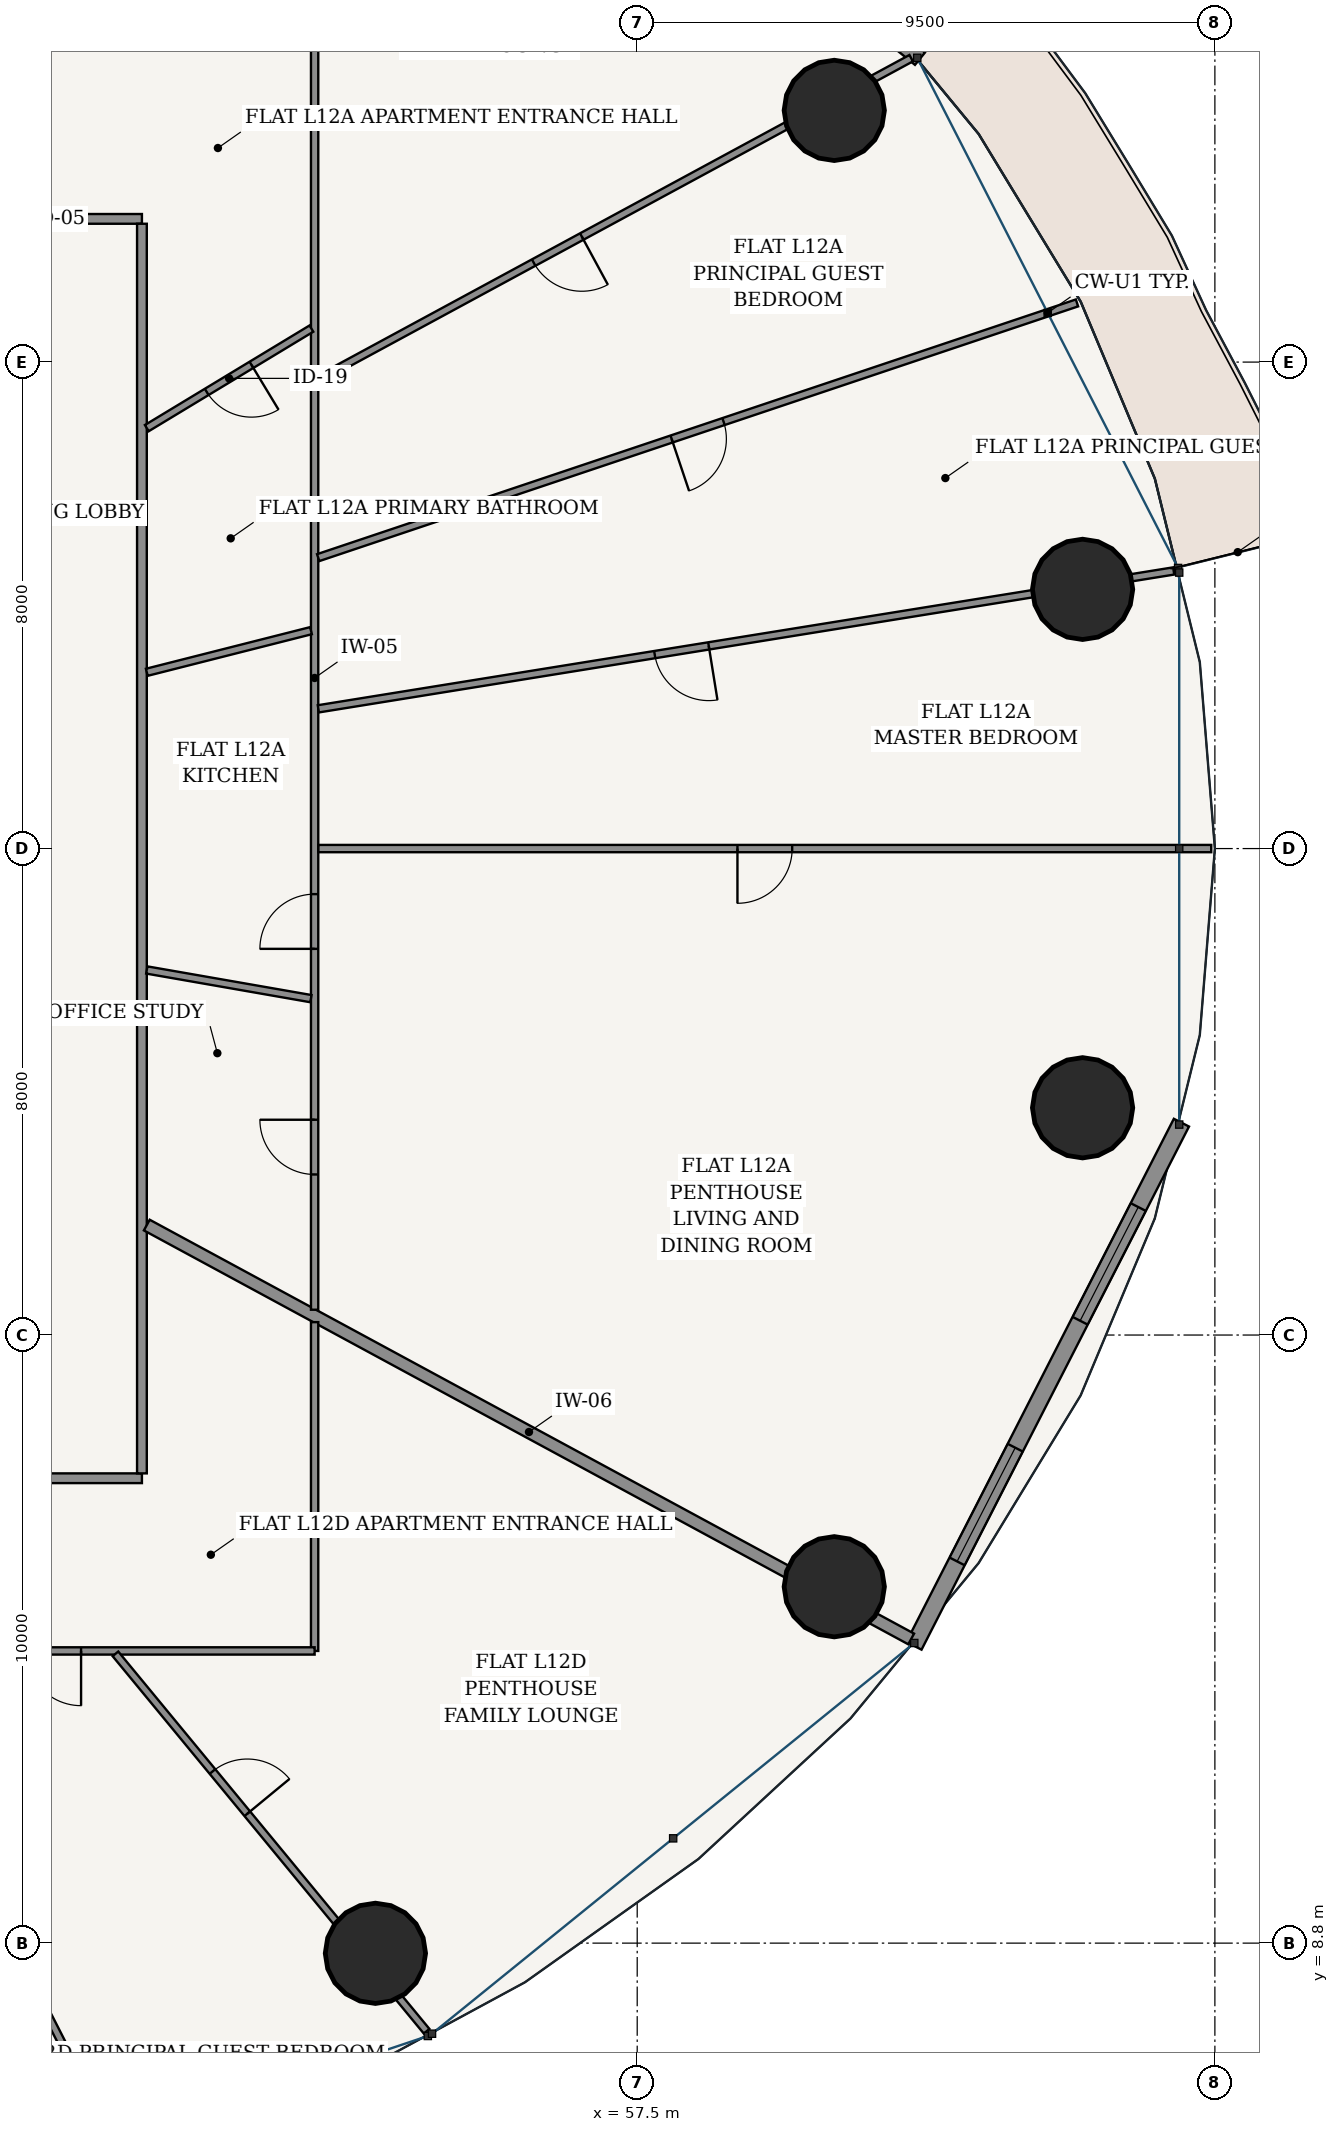
"""IFC4 building model, lengths in metres.
Left out: names, types, materials, properties, quantities, classifications, styles, units other than length and angle.
Written with IfcOpenShell. Run it as: python <this file> out.ifc"""

import sys

from ifc_helpers import new_model, si_unit, direction, frame, frame_2d, origin, origin_2d, place, context, subcontext, project, spatial, rectangle, hollow_circle, extrude, source, transform, mapped, element, fill, save


model = new_model("IFC4")
c1 = context("Model", 3, precision=1e-05, world=origin(), true_north=direction((-0.2419218956, 0.970295726276)))
c2 = subcontext(c1, "Body", "Model", "MODEL_VIEW")
j1 = project(units=[si_unit("LENGTHUNIT", "METRE"), si_unit("PLANEANGLEUNIT", "RADIAN")], contexts=[c1])
p1 = place(None, origin())
s1 = spatial("IfcSite", under=j1, at=p1, CompositionType="ELEMENT")
p2 = place(p1, origin())
s2 = spatial("IfcBuilding", under=s1, at=p2, CompositionType="ELEMENT")
p3 = place(p2, frame((0.0, 0.0, 49.2)))
s3 = spatial("IfcBuildingStorey", under=s2, at=p3, CompositionType="ELEMENT", Elevation=49.2)
for number, where, z_axis, x_axis in (
    (1, (64.824, 31.063, 0.0), (0.0, 0.0, 1.0), (1.0, 0.0, 0.0)),
    (2, (60.741, 38.939, 0.0), (0.0, 0.0, 1.0), (1.0, 0.0, 0.0)),
    (3, (53.195, 8.632, 0.0), (0.0, 0.0, 1.0), (1.0, 0.0, 0.0)),
    (4, (60.741, 14.661, 0.0), (0.0, 0.0, 1.0), (1.0, 0.0, 0.0)),
    (5, (64.824, 22.537, 0.0), (0.0, 0.0, 1.0), (1.0, 0.0, 0.0)),
):
    element("IfcColumn", number, at=place(p3, frame(where, z_axis=z_axis, x_axis=x_axis)), inside=s3, PredefinedType="COLUMN", context=c2, shape_type="SweptSolid", body=[
        extrude(hollow_circle(Radius=0.825, WallThickness=0.05, at=origin_2d()), origin(), (0.0, 0.0, 1.0), 3.6),
    ])
p4 = place(p3, frame((62.15, 39.789, 0.0), z_axis=(0.0, 0.0, 1.0), x_axis=(-0.777005352078, 0.62949398952, 0.0)))
e6 = element("IfcWall", 6, at=p4, inside=s3, PredefinedType="SOLIDWALL", context=c2, shape_type="SweptSolid", body=[
    extrude(rectangle(XDim=10.447, YDim=0.26, at=frame_2d((5.223, 0.0))), origin(), (0.0, 0.0, 1.0), 3.32),
])
p5 = place(p4, frame((4.548, 0.0, 0.0)))
e7 = element("IfcOpeningElement", 7, at=p5, cuts=e6, PredefinedType="OPENING", context=c2, shape_type="SweptSolid", body=[
    extrude(rectangle(XDim=1.35, YDim=2.2, at=frame_2d((0.675, 1.1))), frame((0.0, 0.14, 0.0), z_axis=(0.0, -1.0, 0.0), x_axis=(1.0, 0.0, 0.0)), (0.0, 0.0, 1.0), 0.28),
])
p6 = place(p3, frame((62.051, 13.689, 0.0), z_axis=(0.0, 0.0, 1.0), x_axis=(0.455220575541, 0.890378698984, 0.0)))
e8 = element("IfcWall", 8, at=p6, inside=s3, PredefinedType="SOLIDWALL", context=c2, shape_type="SweptSolid", body=[
    extrude(rectangle(XDim=9.662, YDim=0.28, at=frame_2d((4.831, 0.0))), origin(), (0.0, 0.0, 1.0), 3.32),
])
p7 = place(p6, frame((1.559, 0.0, 0.85)))
e9 = element("IfcOpeningElement", 9, at=p7, cuts=e8, PredefinedType="OPENING", context=c2, shape_type="SweptSolid", body=[
    extrude(rectangle(XDim=2.1, YDim=1.95, at=frame_2d((1.05, 0.975))), frame((0.0, 0.15, 0.0), z_axis=(0.0, -1.0, 0.0), x_axis=(1.0, 0.0, 0.0)), (0.0, 0.0, 1.0), 0.3),
])
p8 = place(p6, frame((6.003, 0.0, 0.85)))
e10 = element("IfcOpeningElement", 10, at=p8, cuts=e8, PredefinedType="OPENING", context=c2, shape_type="SweptSolid", body=[
    extrude(rectangle(XDim=2.1, YDim=1.95, at=frame_2d((1.05, 0.975))), frame((0.0, 0.15, 0.0), z_axis=(0.0, -1.0, 0.0), x_axis=(1.0, 0.0, 0.0)), (0.0, 0.0, 1.0), 0.3),
])
p9 = place(p3, frame((26.645, 16.445, 0.0), z_axis=(0.0, 0.0, 1.0), x_axis=(1.0, 0.0, 0.0)))
e11 = element("IfcWall", 11, at=p9, inside=s3, PredefinedType="PARTITIONING", context=c2, shape_type="SweptSolid", body=[
    extrude(rectangle(XDim=22.71, YDim=0.16, at=frame_2d((11.355, 0.0))), origin(), (0.0, 0.0, 1.0), 2.688),
])
p10 = place(p9, frame((19.962, 0.0, 0.0)))
e12 = element("IfcOpeningElement", 12, at=p10, cuts=e11, PredefinedType="OPENING", context=c2, shape_type="SweptSolid", body=[
    extrude(rectangle(XDim=0.98, YDim=2.2, at=frame_2d((0.49, 1.1))), frame((0.0, 0.09, 0.0), z_axis=(0.0, -1.0, 0.0), x_axis=(1.0, 0.0, 0.0)), (0.0, 0.0, 1.0), 0.18),
])
p11 = place(p3, frame((26.645, 37.155, 0.0), z_axis=(0.0, 0.0, 1.0), x_axis=(1.0, 0.0, 0.0)))
e13 = element("IfcWall", 13, at=p11, inside=s3, PredefinedType="PARTITIONING", context=c2, shape_type="SweptSolid", body=[
    extrude(rectangle(XDim=22.71, YDim=0.16, at=frame_2d((11.355, 0.0))), origin(), (0.0, 0.0, 1.0), 2.688),
])
p12 = place(p11, frame((19.075, 0.0, 0.0)))
e14 = element("IfcOpeningElement", 14, at=p12, cuts=e13, PredefinedType="OPENING", context=c2, shape_type="SweptSolid", body=[
    extrude(rectangle(XDim=0.98, YDim=2.2, at=frame_2d((0.49, 1.1))), frame((0.0, 0.09, 0.0), z_axis=(0.0, -1.0, 0.0), x_axis=(1.0, 0.0, 0.0)), (0.0, 0.0, 1.0), 0.18),
])
p13 = place(p11, frame((6.221, 0.0, 0.0)))
e15 = element("IfcOpeningElement", 15, at=p13, cuts=e13, PredefinedType="OPENING", context=c2, shape_type="SweptSolid", body=[
    extrude(rectangle(XDim=0.98, YDim=2.2, at=frame_2d((0.49, 1.1))), frame((0.0, 0.09, 0.0), z_axis=(0.0, -1.0, 0.0), x_axis=(1.0, 0.0, 0.0)), (0.0, 0.0, 1.0), 0.18),
])
p14 = place(p3, frame((49.355, 16.525, 0.0), z_axis=(0.0, 0.0, 1.0), x_axis=(0.0, 1.0, 0.0)))
e16 = element("IfcWall", 16, at=p14, inside=s3, PredefinedType="PARTITIONING", context=c2, shape_type="SweptSolid", body=[
    extrude(rectangle(XDim=20.55, YDim=0.16, at=frame_2d((10.275, 0.0))), origin(), (0.0, 0.0, 1.0), 2.688),
])
p15 = place(p3, frame((49.435, 20.608, 0.0), z_axis=(0.0, 0.0, 1.0), x_axis=(0.879369737803, -0.476139542819, 0.0)))
e17 = element("IfcWall", 17, at=p15, inside=s3, PredefinedType="PARTITIONING", context=c2, shape_type="SweptSolid", body=[
    extrude(rectangle(XDim=14.295, YDim=0.2, at=frame_2d((7.147, 0.0))), origin(), (0.0, 0.0, 1.0), 2.688),
])
p16 = place(p3, frame((52.195, 39.995, 0.0), z_axis=(0.0, 0.0, 1.0), x_axis=(0.0, -1.0, 0.0)))
e18 = element("IfcWall", 18, at=p16, inside=s3, PredefinedType="PARTITIONING", context=c2, shape_type="SweptSolid", body=[
    extrude(rectangle(XDim=20.779, YDim=0.12, at=frame_2d((10.39, 0.0))), origin(), (0.0, 0.0, 1.0), 2.688),
])
p17 = place(p16, frame((13.944, 0.0, 0.0)))
e19 = element("IfcOpeningElement", 19, at=p17, cuts=e18, PredefinedType="OPENING", context=c2, shape_type="SweptSolid", body=[
    extrude(rectangle(XDim=0.9, YDim=2.15, at=frame_2d((0.45, 1.075))), frame((0.0, 0.07, 0.0), z_axis=(0.0, -1.0, 0.0), x_axis=(1.0, 0.0, 0.0)), (0.0, 0.0, 1.0), 0.14),
])
p18 = place(p16, frame((17.655, 0.0, 0.0)))
e20 = element("IfcOpeningElement", 20, at=p18, cuts=e18, PredefinedType="OPENING", context=c2, shape_type="SweptSolid", body=[
    extrude(rectangle(XDim=0.9, YDim=2.15, at=frame_2d((0.45, 1.075))), frame((0.0, 0.07, 0.0), z_axis=(0.0, -1.0, 0.0), x_axis=(1.0, 0.0, 0.0)), (0.0, 0.0, 1.0), 0.14),
])
p19 = place(p3, frame((52.257, 26.8, 0.0), z_axis=(0.0, 0.0, 1.0), x_axis=(1.0, 0.0, 0.0)))
e21 = element("IfcWall", 21, at=p19, inside=s3, PredefinedType="PARTITIONING", context=c2, shape_type="SweptSolid", body=[
    extrude(rectangle(XDim=14.683, YDim=0.12, at=frame_2d((7.341, 0.0))), origin(), (0.0, 0.0, 1.0), 2.762),
])
p20 = place(p19, frame((6.892, 0.0, 0.0)))
e22 = element("IfcOpeningElement", 22, at=p20, cuts=e21, PredefinedType="OPENING", context=c2, shape_type="SweptSolid", body=[
    extrude(rectangle(XDim=0.9, YDim=2.15, at=frame_2d((0.45, 1.075))), frame((0.0, 0.07, 0.0), z_axis=(0.0, -1.0, 0.0), x_axis=(1.0, 0.0, 0.0)), (0.0, 0.0, 1.0), 0.14),
])
p21 = place(p3, frame((52.256, 29.098, 0.0), z_axis=(0.0, 0.0, 1.0), x_axis=(0.987257017041, 0.159133850272, 0.0)))
e23 = element("IfcWall", 23, at=p21, inside=s3, PredefinedType="PARTITIONING", context=c2, shape_type="SweptSolid", body=[
    extrude(rectangle(XDim=14.248, YDim=0.12, at=frame_2d((7.124, 0.0))), origin(), (0.0, 0.0, 1.0), 2.688),
])
p22 = place(p21, frame((5.603, 0.0, 0.0)))
e24 = element("IfcOpeningElement", 24, at=p22, cuts=e23, PredefinedType="OPENING", context=c2, shape_type="SweptSolid", body=[
    extrude(rectangle(XDim=0.9, YDim=2.15, at=frame_2d((0.45, 1.075))), frame((0.0, 0.07, 0.0), z_axis=(0.0, -1.0, 0.0), x_axis=(1.0, 0.0, 0.0)), (0.0, 0.0, 1.0), 0.14),
])
p23 = place(p3, frame((52.254, 31.584, 0.0), z_axis=(0.0, 0.0, 1.0), x_axis=(0.948022802246, 0.318202398516, 0.0)))
e25 = element("IfcWall", 25, at=p23, inside=s3, PredefinedType="PARTITIONING", context=c2, shape_type="SweptSolid", body=[
    extrude(rectangle(XDim=13.163, YDim=0.12, at=frame_2d((6.582, 0.0))), origin(), (0.0, 0.0, 1.0), 2.762),
])
p24 = place(p23, frame((6.131, 0.0, 0.0)))
e26 = element("IfcOpeningElement", 26, at=p24, cuts=e25, PredefinedType="OPENING", context=c2, shape_type="SweptSolid", body=[
    extrude(rectangle(XDim=0.9, YDim=2.15, at=frame_2d((0.45, 1.075))), frame((0.0, 0.07, 0.0), z_axis=(0.0, -1.0, 0.0), x_axis=(1.0, 0.0, 0.0)), (0.0, 0.0, 1.0), 0.14),
])
p25 = place(p3, frame((52.25, 34.515, 0.0), z_axis=(0.0, 0.0, 1.0), x_axis=(0.879370672984, 0.476137815654, 0.0)))
e27 = element("IfcWall", 27, at=p25, inside=s3, PredefinedType="PARTITIONING", context=c2, shape_type="SweptSolid", body=[
    extrude(rectangle(XDim=11.094, YDim=0.12, at=frame_2d((5.547, 0.0))), origin(), (0.0, 0.0, 1.0), 2.688),
])
p26 = place(p25, frame((4.034, 0.0, 0.0)))
e28 = element("IfcOpeningElement", 28, at=p26, cuts=e27, PredefinedType="OPENING", context=c2, shape_type="SweptSolid", body=[
    extrude(rectangle(XDim=0.9, YDim=2.15, at=frame_2d((0.45, 1.075))), frame((0.0, 0.07, 0.0), z_axis=(0.0, -1.0, 0.0), x_axis=(1.0, 0.0, 0.0)), (0.0, 0.0, 1.0), 0.14),
])
p27 = place(p3, frame((49.435, 24.803, 0.0), z_axis=(0.0, 0.0, 1.0), x_axis=(0.985100365489, -0.171980434681, 0.0)))
e29 = element("IfcWall", 29, at=p27, inside=s3, PredefinedType="PARTITIONING", context=c2, shape_type="SweptSolid", body=[
    extrude(rectangle(XDim=2.74, YDim=0.12, at=frame_2d((1.37, 0.0))), origin(), (0.0, 0.0, 1.0), 3.32),
])
p28 = place(p3, frame((49.435, 29.699, 0.0), z_axis=(0.0, 0.0, 1.0), x_axis=(0.969327617988, 0.245772189243, 0.0)))
e30 = element("IfcWall", 30, at=p28, inside=s3, PredefinedType="PARTITIONING", context=c2, shape_type="SweptSolid", body=[
    extrude(rectangle(XDim=2.785, YDim=0.12, at=frame_2d((1.393, 0.0))), origin(), (0.0, 0.0, 1.0), 3.32),
])
p29 = place(p3, frame((49.435, 33.714, 0.0), z_axis=(0.0, 0.0, 1.0), x_axis=(0.855724035959, 0.517432482824, 0.0)))
e31 = element("IfcWall", 31, at=p29, inside=s3, PredefinedType="PARTITIONING", context=c2, shape_type="SweptSolid", body=[
    extrude(rectangle(XDim=3.163, YDim=0.12, at=frame_2d((1.582, 0.0))), origin(), (0.0, 0.0, 1.0), 3.32),
])
p30 = place(p29, frame((1.152, 0.0, 0.0)))
e32 = element("IfcOpeningElement", 32, at=p30, cuts=e31, PredefinedType="OPENING", context=c2, shape_type="SweptSolid", body=[
    extrude(rectangle(XDim=0.86, YDim=2.15, at=frame_2d((0.43, 1.075))), frame((0.0, 0.07, 0.0), z_axis=(0.0, -1.0, 0.0), x_axis=(1.0, 0.0, 0.0)), (0.0, 0.0, 1.0), 0.14),
])
p31 = place(p3, frame((43.335, 37.237, 0.0), z_axis=(0.0, 0.0, 1.0), x_axis=(0.455148959499, 0.890415310216, 0.0)))
e33 = element("IfcWall", 33, at=p31, inside=s3, PredefinedType="PARTITIONING", context=c2, shape_type="SweptSolid", body=[
    extrude(rectangle(XDim=12.598, YDim=0.2, at=frame_2d((6.299, 0.0))), origin(), (0.0, 0.0, 1.0), 2.762),
])
p32 = place(p3, frame((52.195, 19.012, 0.0), z_axis=(0.0, 0.0, 1.0), x_axis=(0.0, -1.0, 0.0)))
e34 = element("IfcWall", 34, at=p32, inside=s3, PredefinedType="PARTITIONING", context=c2, shape_type="SweptSolid", body=[
    extrude(rectangle(XDim=5.407, YDim=0.12, at=frame_2d((2.704, 0.0))), origin(), (0.0, 0.0, 1.0), 2.999),
])
p33 = place(p3, frame((52.195, 13.605, 0.0), z_axis=(0.0, 0.0, 1.0), x_axis=(-1.0, 0.0, 0.0)))
e35 = element("IfcWall", 35, at=p33, inside=s3, PredefinedType="PARTITIONING", context=c2, shape_type="SweptSolid", body=[
    extrude(rectangle(XDim=24.973, YDim=0.12, at=frame_2d((12.487, 0.0))), origin(), (0.0, 0.0, 1.0), 2.688),
])
p34 = place(p33, frame((3.841, 0.0, 0.0)))
e36 = element("IfcOpeningElement", 36, at=p34, cuts=e35, PredefinedType="OPENING", context=c2, shape_type="SweptSolid", body=[
    extrude(rectangle(XDim=0.9, YDim=2.15, at=frame_2d((0.45, 1.075))), frame((0.0, 0.07, 0.0), z_axis=(0.0, -1.0, 0.0), x_axis=(1.0, 0.0, 0.0)), (0.0, 0.0, 1.0), 0.14),
])
p35 = place(p33, frame((15.819, 0.0, 0.0)))
e37 = element("IfcOpeningElement", 37, at=p35, cuts=e35, PredefinedType="OPENING", context=c2, shape_type="SweptSolid", body=[
    extrude(rectangle(XDim=0.9, YDim=2.15, at=frame_2d((0.45, 1.075))), frame((0.0, 0.07, 0.0), z_axis=(0.0, -1.0, 0.0), x_axis=(1.0, 0.0, 0.0)), (0.0, 0.0, 1.0), 0.14),
])
p36 = place(p33, frame((21.123, 0.0, 0.0)))
e38 = element("IfcOpeningElement", 38, at=p36, cuts=e35, PredefinedType="OPENING", context=c2, shape_type="SweptSolid", body=[
    extrude(rectangle(XDim=0.9, YDim=2.15, at=frame_2d((0.45, 1.075))), frame((0.0, 0.07, 0.0), z_axis=(0.0, -1.0, 0.0), x_axis=(1.0, 0.0, 0.0)), (0.0, 0.0, 1.0), 0.14),
])
p37 = place(p3, frame((44.773, 13.55, 0.0), z_axis=(0.0, 0.0, 1.0), x_axis=(0.455131567849, -0.890424200001, 0.0)))
e39 = element("IfcWall", 39, at=p37, inside=s3, PredefinedType="PARTITIONING", context=c2, shape_type="SweptSolid", body=[
    extrude(rectangle(XDim=9.439, YDim=0.12, at=frame_2d((4.719, 0.0))), origin(), (0.0, 0.0, 1.0), 2.762),
])
p38 = place(p37, frame((4.269, 0.0, 0.0)))
e40 = element("IfcOpeningElement", 40, at=p38, cuts=e39, PredefinedType="OPENING", context=c2, shape_type="SweptSolid", body=[
    extrude(rectangle(XDim=0.9, YDim=2.15, at=frame_2d((0.45, 1.075))), frame((0.0, 0.07, 0.0), z_axis=(0.0, -1.0, 0.0), x_axis=(1.0, 0.0, 0.0)), (0.0, 0.0, 1.0), 0.14),
])
p39 = place(p3, frame((48.919, 13.557, 0.0), z_axis=(0.0, 0.0, 1.0), x_axis=(0.636193310573, -0.771529695852, 0.0)))
e41 = element("IfcWall", 41, at=p39, inside=s3, PredefinedType="PARTITIONING", context=c2, shape_type="SweptSolid", body=[
    extrude(rectangle(XDim=8.044, YDim=0.12, at=frame_2d((4.022, 0.0))), origin(), (0.0, 0.0, 1.0), 2.688),
])
p40 = place(p39, frame((2.508, 0.0, 0.0)))
e42 = element("IfcOpeningElement", 42, at=p40, cuts=e41, PredefinedType="OPENING", context=c2, shape_type="SweptSolid", body=[
    extrude(rectangle(XDim=0.9, YDim=2.15, at=frame_2d((0.45, 1.075))), frame((0.0, 0.07, 0.0), z_axis=(0.0, -1.0, 0.0), x_axis=(1.0, 0.0, 0.0)), (0.0, 0.0, 1.0), 0.14),
])
m1 = source(origin(), c2, "Body", "SweptSolid", [
    extrude(rectangle(XDim=2.1, YDim=1.95, at=frame_2d((1.05, 0.975))), frame((0.0, 0.03, 0.0), z_axis=(0.0, -1.0, 0.0), x_axis=(1.0, 0.0, 0.0)), (0.0, 0.0, 1.0), 0.06),
])
p41 = place(p7, origin())
e43 = element("IfcWindow", 43, at=p41, inside=s3, PartitioningType="SINGLE_PANEL", PredefinedType="WINDOW", context=c2, shape_type="MappedRepresentation", body=[
    mapped(m1, transform((0.0, 0.0, 0.0), scale=1.0)),
])
fill(e9, e43)
p42 = place(p8, origin())
e44 = element("IfcWindow", 44, at=p42, inside=s3, PartitioningType="SINGLE_PANEL", PredefinedType="WINDOW", context=c2, shape_type="MappedRepresentation", body=[
    mapped(m1, transform((0.0, 0.0, 0.0), scale=1.0)),
])
fill(e10, e44)
m2 = source(origin(), c2, "Body", "SweptSolid", [
    extrude(rectangle(XDim=0.86, YDim=2.15, at=frame_2d((0.43, 1.075))), frame((0.0, 0.025, 0.0), z_axis=(0.0, -1.0, 0.0), x_axis=(1.0, 0.0, 0.0)), (0.0, 0.0, 1.0), 0.05),
])
p43 = place(p30, frame((0.86, 0.0, 0.0), z_axis=(0.0, 0.0, 1.0), x_axis=(-1.0, 0.0, 0.0)))
e45 = element("IfcDoor", 45, at=p43, inside=s3, OperationType="SINGLE_SWING_LEFT", PredefinedType="DOOR", context=c2, shape_type="MappedRepresentation", body=[
    mapped(m2, transform((0.0, 0.0, 0.0), scale=1.0)),
])
fill(e32, e45)
m3 = source(origin(), c2, "Body", "SweptSolid", [
    extrude(rectangle(XDim=0.9, YDim=2.15, at=frame_2d((0.45, 1.075))), frame((0.0, 0.025, 0.0), z_axis=(0.0, -1.0, 0.0), x_axis=(1.0, 0.0, 0.0)), (0.0, 0.0, 1.0), 0.05),
])
p44 = place(p26, frame((0.9, 0.0, 0.0), z_axis=(0.0, 0.0, 1.0), x_axis=(-1.0, 0.0, 0.0)))
e46 = element("IfcDoor", 46, at=p44, inside=s3, OperationType="SINGLE_SWING_LEFT", PredefinedType="DOOR", context=c2, shape_type="MappedRepresentation", body=[
    mapped(m3, transform((0.0, 0.0, 0.0), scale=1.0)),
])
fill(e28, e46)
p45 = place(p24, frame((0.9, 0.0, 0.0), z_axis=(0.0, 0.0, 1.0), x_axis=(-1.0, 0.0, 0.0)))
e47 = element("IfcDoor", 47, at=p45, inside=s3, OperationType="SINGLE_SWING_RIGHT", PredefinedType="DOOR", context=c2, shape_type="MappedRepresentation", body=[
    mapped(m3, transform((0.0, 0.0, 0.0), scale=1.0)),
])
fill(e26, e47)
p46 = place(p22, frame((0.9, 0.0, 0.0), z_axis=(0.0, 0.0, 1.0), x_axis=(-1.0, 0.0, 0.0)))
e48 = element("IfcDoor", 48, at=p46, inside=s3, OperationType="SINGLE_SWING_LEFT", PredefinedType="DOOR", context=c2, shape_type="MappedRepresentation", body=[
    mapped(m3, transform((0.0, 0.0, 0.0), scale=1.0)),
])
fill(e24, e48)
p47 = place(p20, frame((0.9, 0.0, 0.0), z_axis=(0.0, 0.0, 1.0), x_axis=(-1.0, 0.0, 0.0)))
e49 = element("IfcDoor", 49, at=p47, inside=s3, OperationType="SINGLE_SWING_RIGHT", PredefinedType="DOOR", context=c2, shape_type="MappedRepresentation", body=[
    mapped(m3, transform((0.0, 0.0, 0.0), scale=1.0)),
])
fill(e22, e49)
p48 = place(p17, frame((0.9, 0.0, 0.0), z_axis=(0.0, 0.0, 1.0), x_axis=(-1.0, 0.0, 0.0)))
e50 = element("IfcDoor", 50, at=p48, inside=s3, OperationType="SINGLE_SWING_LEFT", PredefinedType="DOOR", context=c2, shape_type="MappedRepresentation", body=[
    mapped(m3, transform((0.0, 0.0, 0.0), scale=1.0)),
])
fill(e19, e50)
p49 = place(p18, frame((0.9, 0.0, 0.0), z_axis=(0.0, 0.0, 1.0), x_axis=(-1.0, 0.0, 0.0)))
e51 = element("IfcDoor", 51, at=p49, inside=s3, OperationType="SINGLE_SWING_RIGHT", PredefinedType="DOOR", context=c2, shape_type="MappedRepresentation", body=[
    mapped(m3, transform((0.0, 0.0, 0.0), scale=1.0)),
])
fill(e20, e51)
p50 = place(p34, origin())
e52 = element("IfcDoor", 52, at=p50, inside=s3, OperationType="SINGLE_SWING_LEFT", PredefinedType="DOOR", context=c2, shape_type="MappedRepresentation", body=[
    mapped(m3, transform((0.0, 0.0, 0.0), scale=1.0)),
])
fill(e36, e52)
p51 = place(p40, origin())
e53 = element("IfcDoor", 53, at=p51, inside=s3, OperationType="SINGLE_SWING_RIGHT", PredefinedType="DOOR", context=c2, shape_type="MappedRepresentation", body=[
    mapped(m3, transform((0.0, 0.0, 0.0), scale=1.0)),
])
fill(e42, e53)
save(model, sys.argv[1])
